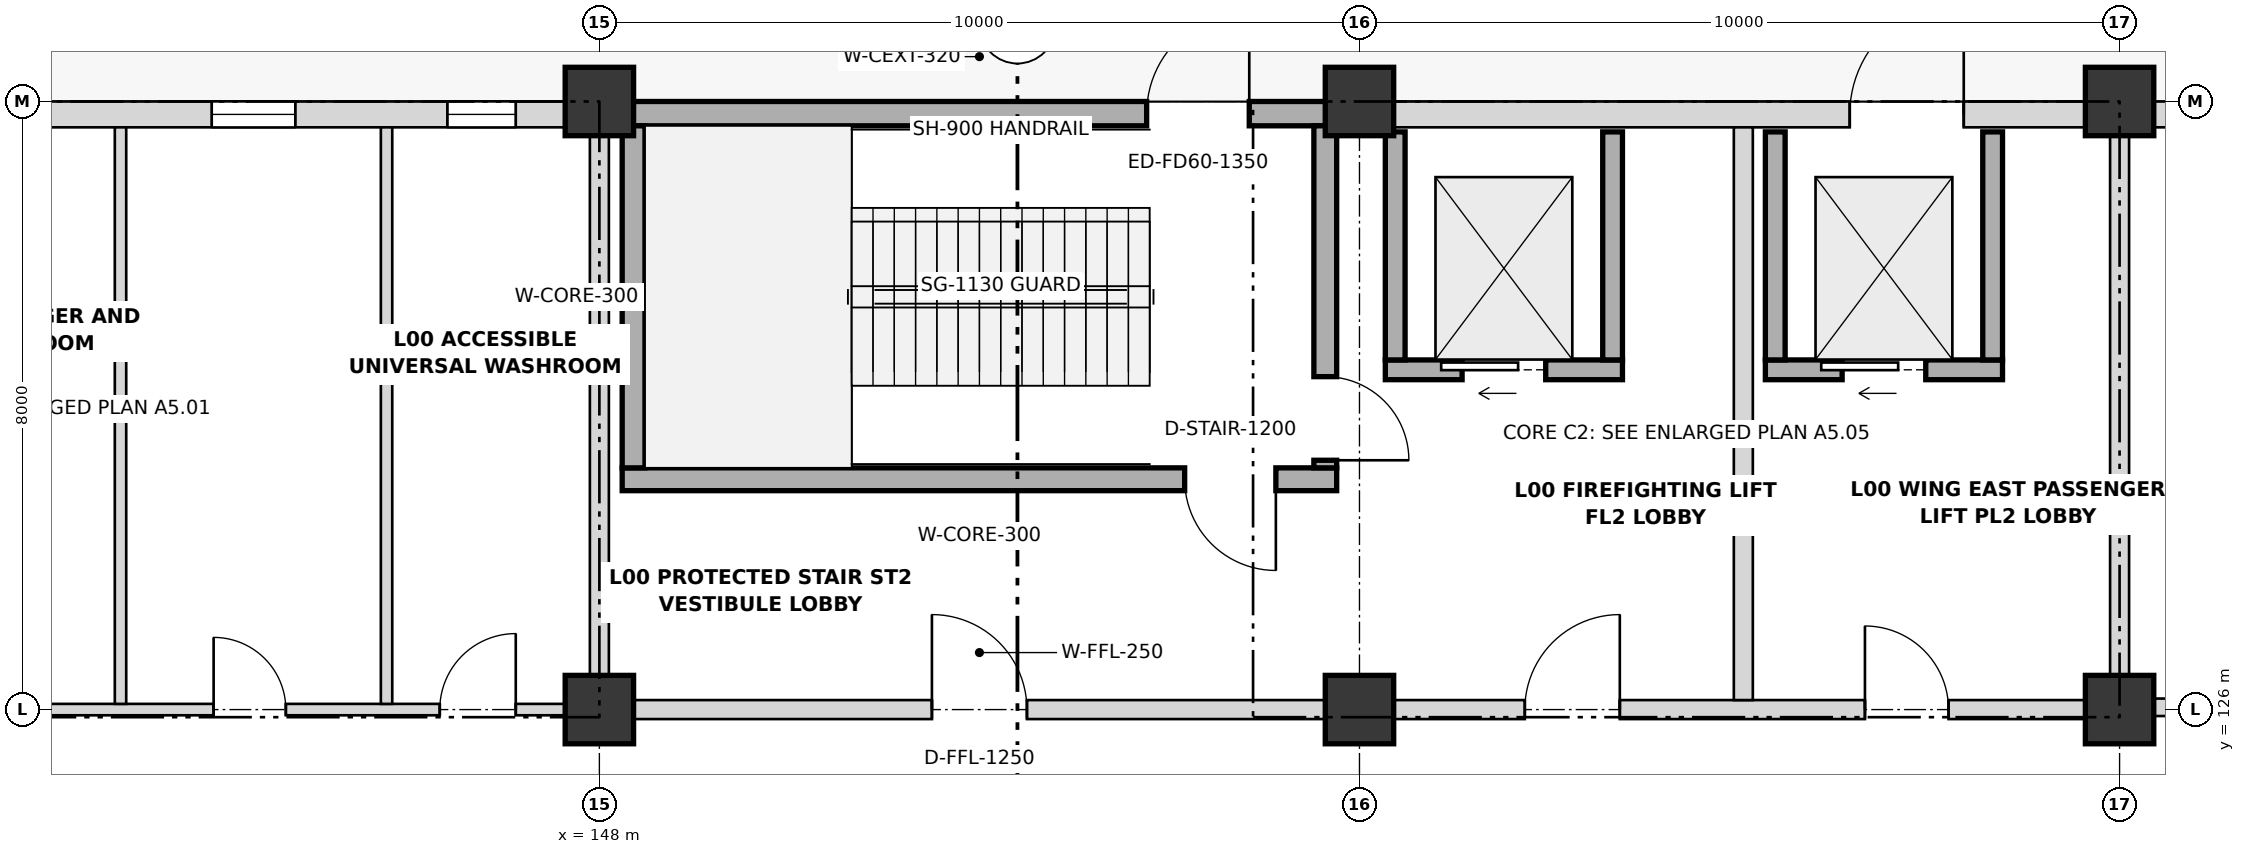
"""IFC4 building model, lengths in metres.
Left out: names, types, materials, properties, quantities, classifications, styles, units other than length and angle.
Written with IfcOpenShell. Run it as: python <this file> out.ifc"""

import sys

from ifc_helpers import new_model, si_unit, direction, frame, frame_2d, origin, origin_2d, place, context, subcontext, project, spatial, rectangle, extrude, element, fill, save


model = new_model("IFC4")
c1 = context("Model", 3, precision=1e-05, world=origin(), true_north=direction((0.0, 1.0)))
c2 = subcontext(c1, "Body", "Model", "MODEL_VIEW")
j1 = project(units=[si_unit("LENGTHUNIT", "METRE"), si_unit("PLANEANGLEUNIT", "RADIAN")], contexts=[c1])
p1 = place(None, origin())
s1 = spatial("IfcSite", under=j1, at=p1, CompositionType="ELEMENT")
p2 = place(p1, origin())
s2 = spatial("IfcBuilding", under=s1, at=p2, CompositionType="ELEMENT")
p3 = place(p2, origin())
s3 = spatial("IfcBuildingStorey", under=s2, at=p3, CompositionType="ELEMENT", Elevation=0.0)
for number, where, z_axis, x_axis in (
    (1, (148.0, 126.0, 0.0), (0.0, 0.0, 1.0), (1.0, 0.0, 0.0)),
    (2, (148.0, 134.0, 0.0), (0.0, 0.0, 1.0), (1.0, 0.0, 0.0)),
    (3, (158.0, 126.0, 0.0), (0.0, 0.0, 1.0), (1.0, 0.0, 0.0)),
    (4, (158.0, 134.0, 0.0), (0.0, 0.0, 1.0), (1.0, 0.0, 0.0)),
    (5, (168.0, 126.0, 0.0), (0.0, 0.0, 1.0), (1.0, 0.0, 0.0)),
    (6, (168.0, 134.0, 0.0), (0.0, 0.0, 1.0), (1.0, 0.0, 0.0)),
):
    element("IfcColumn", number, at=place(p3, frame(where, z_axis=z_axis, x_axis=x_axis)), inside=s3, PredefinedType="COLUMN", context=c2, shape_type="SweptSolid", body=[
        extrude(rectangle(XDim=0.9, YDim=0.9, at=origin_2d()), origin(), (0.0, 0.0, 1.0), 5.4),
    ])
p4 = place(p3, frame((138.445, 133.83, 0.0), z_axis=(0.0, 0.0, 1.0), x_axis=(1.0, 0.0, 0.0)))
e7 = element("IfcWall", 7, at=p4, inside=s3, PredefinedType="SOLIDWALL", context=c2, shape_type="SweptSolid", body=[
    extrude(rectangle(XDim=9.11, YDim=0.34, at=frame_2d((4.555, 0.0))), origin(), (0.0, 0.0, 1.0), 4.358),
])
p5 = place(p4, frame((1.155, 0.0, 1.85)))
e8 = element("IfcOpeningElement", 8, at=p5, cuts=e7, PredefinedType="OPENING", context=c2, shape_type="SweptSolid", body=[
    extrude(rectangle(XDim=0.9, YDim=1.15, at=frame_2d((0.45, 0.575))), frame((0.0, 0.18, 0.0), z_axis=(0.0, -1.0, 0.0), x_axis=(1.0, 0.0, 0.0)), (0.0, 0.0, 1.0), 0.36),
])
p6 = place(p4, frame((4.455, 0.0, 1.85)))
e9 = element("IfcOpeningElement", 9, at=p6, cuts=e7, PredefinedType="OPENING", context=c2, shape_type="SweptSolid", body=[
    extrude(rectangle(XDim=1.1, YDim=1.15, at=frame_2d((0.55, 0.575))), frame((0.0, 0.18, 0.0), z_axis=(0.0, -1.0, 0.0), x_axis=(1.0, 0.0, 0.0)), (0.0, 0.0, 1.0), 0.36),
])
p7 = place(p4, frame((7.555, 0.0, 1.85)))
e10 = element("IfcOpeningElement", 10, at=p7, cuts=e7, PredefinedType="OPENING", context=c2, shape_type="SweptSolid", body=[
    extrude(rectangle(XDim=0.9, YDim=1.15, at=frame_2d((0.45, 0.575))), frame((0.0, 0.18, 0.0), z_axis=(0.0, -1.0, 0.0), x_axis=(1.0, 0.0, 0.0)), (0.0, 0.0, 1.0), 0.36),
])
p8 = place(p3, frame((148.445, 133.84, 0.0), z_axis=(0.0, 0.0, 1.0), x_axis=(1.0, 0.0, 0.0)))
e11 = element("IfcWall", 11, at=p8, inside=s3, PredefinedType="SHEAR", context=c2, shape_type="SweptSolid", body=[
    extrude(rectangle(XDim=9.11, YDim=0.32, at=frame_2d((4.555, 0.0))), origin(), (0.0, 0.0, 1.0), 5.4),
])
p9 = place(p8, frame((6.755, 0.0, 0.0)))
e12 = element("IfcOpeningElement", 12, at=p9, cuts=e11, PredefinedType="OPENING", context=c2, shape_type="SweptSolid", body=[
    extrude(rectangle(XDim=1.35, YDim=2.2, at=frame_2d((0.675, 1.1))), frame((0.0, 0.17, 0.0), z_axis=(0.0, -1.0, 0.0), x_axis=(1.0, 0.0, 0.0)), (0.0, 0.0, 1.0), 0.34),
])
p10 = place(p3, frame((158.445, 133.83, 0.0), z_axis=(0.0, 0.0, 1.0), x_axis=(1.0, 0.0, 0.0)))
e13 = element("IfcWall", 13, at=p10, inside=s3, PredefinedType="SOLIDWALL", context=c2, shape_type="SweptSolid", body=[
    extrude(rectangle(XDim=9.11, YDim=0.34, at=frame_2d((4.555, 0.0))), origin(), (0.0, 0.0, 1.0), 4.358),
])
p11 = place(p10, frame((6.005, 0.0, 0.0)))
e14 = element("IfcOpeningElement", 14, at=p11, cuts=e13, PredefinedType="OPENING", context=c2, shape_type="SweptSolid", body=[
    extrude(rectangle(XDim=1.5, YDim=2.25, at=frame_2d((0.75, 1.125))), frame((0.0, 0.18, 0.0), z_axis=(0.0, -1.0, 0.0), x_axis=(1.0, 0.0, 0.0)), (0.0, 0.0, 1.0), 0.36),
])
p12 = place(p3, frame((168.445, 133.83, 0.0), z_axis=(0.0, 0.0, 1.0), x_axis=(1.0, 0.0, 0.0)))
e15 = element("IfcWall", 15, at=p12, inside=s3, PredefinedType="SOLIDWALL", context=c2, shape_type="SweptSolid", body=[
    extrude(rectangle(XDim=9.11, YDim=0.34, at=frame_2d((4.555, 0.0))), origin(), (0.0, 0.0, 1.0), 4.358),
])
p13 = place(p12, frame((2.755, 0.0, 0.0)))
e16 = element("IfcOpeningElement", 16, at=p13, cuts=e15, PredefinedType="OPENING", context=c2, shape_type="SweptSolid", body=[
    extrude(rectangle(XDim=1.8, YDim=2.25, at=frame_2d((0.9, 1.125))), frame((0.0, 0.18, 0.0), z_axis=(0.0, -1.0, 0.0), x_axis=(1.0, 0.0, 0.0)), (0.0, 0.0, 1.0), 0.36),
])
p14 = place(p12, frame((6.405, 0.0, 1.15)))
e17 = element("IfcOpeningElement", 17, at=p14, cuts=e15, PredefinedType="OPENING", context=c2, shape_type="SweptSolid", body=[
    extrude(rectangle(XDim=1.1, YDim=1.15, at=frame_2d((0.55, 0.575))), frame((0.0, 0.18, 0.0), z_axis=(0.0, -1.0, 0.0), x_axis=(1.0, 0.0, 0.0)), (0.0, 0.0, 1.0), 0.36),
])
p15 = place(p3, frame((157.7, 129.03, 0.0), z_axis=(0.0, 0.0, 1.0), x_axis=(-1.0, 0.0, 0.0)))
e18 = element("IfcWall", 18, at=p15, inside=s3, PredefinedType="SHEAR", context=c2, shape_type="SweptSolid", body=[
    extrude(rectangle(XDim=9.4, YDim=0.3, at=frame_2d((4.7, 0.0))), origin(), (0.0, 0.0, 1.0), 5.4),
])
p16 = place(p15, frame((0.8, 0.0, 0.0)))
e19 = element("IfcOpeningElement", 19, at=p16, cuts=e18, PredefinedType="OPENING", context=c2, shape_type="SweptSolid", body=[
    extrude(rectangle(XDim=1.2, YDim=2.15, at=frame_2d((0.6, 1.075))), frame((0.0, 0.16, 0.0), z_axis=(0.0, -1.0, 0.0), x_axis=(1.0, 0.0, 0.0)), (0.0, 0.0, 1.0), 0.32),
])
p17 = place(p3, frame((157.55, 133.68, 0.0), z_axis=(0.0, 0.0, 1.0), x_axis=(0.0, -1.0, 0.0)))
e20 = element("IfcWall", 20, at=p17, inside=s3, PredefinedType="SHEAR", context=c2, shape_type="SweptSolid", body=[
    extrude(rectangle(XDim=4.5, YDim=0.3, at=frame_2d((2.25, 0.0))), origin(), (0.0, 0.0, 1.0), 5.4),
])
p18 = place(p17, frame((3.3, 0.0, 0.0)))
e21 = element("IfcOpeningElement", 21, at=p18, cuts=e20, PredefinedType="OPENING", context=c2, shape_type="SweptSolid", body=[
    extrude(rectangle(XDim=1.1, YDim=2.15, at=frame_2d((0.55, 1.075))), frame((0.0, 0.16, 0.0), z_axis=(0.0, -1.0, 0.0), x_axis=(1.0, 0.0, 0.0)), (0.0, 0.0, 1.0), 0.32),
])
p19 = place(p3, frame((148.45, 129.18, 0.0), z_axis=(0.0, 0.0, 1.0), x_axis=(0.0, 1.0, 0.0)))
e22 = element("IfcWall", 22, at=p19, inside=s3, PredefinedType="SHEAR", context=c2, shape_type="SweptSolid", body=[
    extrude(rectangle(XDim=4.5, YDim=0.3, at=frame_2d((2.25, 0.0))), origin(), (0.0, 0.0, 1.0), 5.4),
])
p20 = place(p3, frame((158.34, 130.47, 0.0), z_axis=(0.0, 0.0, 1.0), x_axis=(1.0, 0.0, 0.0)))
e23 = element("IfcWall", 23, at=p20, inside=s3, PredefinedType="SHEAR", context=c2, shape_type="SweptSolid", body=[
    extrude(rectangle(XDim=3.12, YDim=0.26, at=frame_2d((1.56, 0.0))), origin(), (0.0, 0.0, 1.0), 5.4),
])
p21 = place(p20, frame((1.01, 0.0, 0.0)))
e24 = element("IfcOpeningElement", 24, at=p21, cuts=e23, PredefinedType="OPENING", context=c2, shape_type="SweptSolid", body=[
    extrude(rectangle(XDim=1.1, YDim=2.1, at=frame_2d((0.55, 1.05))), frame((0.0, 0.14, 0.0), z_axis=(0.0, -1.0, 0.0), x_axis=(1.0, 0.0, 0.0)), (0.0, 0.0, 1.0), 0.28),
])
for number, where, z_axis, x_axis in (
    (25, (158.47, 130.6, 0.0), (0.0, 0.0, 1.0), (0.0, 1.0, 0.0)),
    (26, (161.33, 130.6, 0.0), (0.0, 0.0, 1.0), (0.0, 1.0, 0.0)),
):
    element("IfcWall", number, at=place(p3, frame(where, z_axis=z_axis, x_axis=x_axis)), inside=s3, PredefinedType="SHEAR", context=c2, shape_type="SweptSolid", body=[
        extrude(rectangle(XDim=3.0, YDim=0.26, at=frame_2d((1.5, 0.0))), origin(), (0.0, 0.0, 1.0), 5.4),
    ])
p22 = place(p3, frame((163.34, 130.47, 0.0), z_axis=(0.0, 0.0, 1.0), x_axis=(1.0, 0.0, 0.0)))
e27 = element("IfcWall", 27, at=p22, inside=s3, PredefinedType="SHEAR", context=c2, shape_type="SweptSolid", body=[
    extrude(rectangle(XDim=3.12, YDim=0.26, at=frame_2d((1.56, 0.0))), origin(), (0.0, 0.0, 1.0), 5.4),
])
p23 = place(p22, frame((1.01, 0.0, 0.0)))
e28 = element("IfcOpeningElement", 28, at=p23, cuts=e27, PredefinedType="OPENING", context=c2, shape_type="SweptSolid", body=[
    extrude(rectangle(XDim=1.1, YDim=2.15, at=frame_2d((0.55, 1.075))), frame((0.0, 0.14, 0.0), z_axis=(0.0, -1.0, 0.0), x_axis=(1.0, 0.0, 0.0)), (0.0, 0.0, 1.0), 0.28),
])
for number, where, z_axis, x_axis in (
    (29, (163.47, 130.6, 0.0), (0.0, 0.0, 1.0), (0.0, 1.0, 0.0)),
    (30, (166.33, 130.6, 0.0), (0.0, 0.0, 1.0), (0.0, 1.0, 0.0)),
):
    element("IfcWall", number, at=place(p3, frame(where, z_axis=z_axis, x_axis=x_axis)), inside=s3, PredefinedType="SHEAR", context=c2, shape_type="SweptSolid", body=[
        extrude(rectangle(XDim=3.0, YDim=0.26, at=frame_2d((1.5, 0.0))), origin(), (0.0, 0.0, 1.0), 5.4),
    ])
p24 = place(p3, frame((138.455, 126.0, 0.0), z_axis=(0.0, 0.0, 1.0), x_axis=(1.0, 0.0, 0.0)))
e31 = element("IfcWall", 31, at=p24, inside=s3, PredefinedType="PARTITIONING", context=c2, shape_type="SweptSolid", body=[
    extrude(rectangle(XDim=9.09, YDim=0.15, at=frame_2d((4.545, 0.0))), origin(), (0.0, 0.0, 1.0), 4.258),
])
p25 = place(p24, frame((1.095, 0.0, 0.0)))
e32 = element("IfcOpeningElement", 32, at=p25, cuts=e31, PredefinedType="OPENING", context=c2, shape_type="SweptSolid", body=[
    extrude(rectangle(XDim=0.9, YDim=2.05, at=frame_2d((0.45, 1.025))), frame((0.0, 0.085, 0.0), z_axis=(0.0, -1.0, 0.0), x_axis=(1.0, 0.0, 0.0)), (0.0, 0.0, 1.0), 0.17),
])
p26 = place(p24, frame((4.47, 0.0, 0.0)))
e33 = element("IfcOpeningElement", 33, at=p26, cuts=e31, PredefinedType="OPENING", context=c2, shape_type="SweptSolid", body=[
    extrude(rectangle(XDim=0.95, YDim=2.05, at=frame_2d((0.475, 1.025))), frame((0.0, 0.085, 0.0), z_axis=(0.0, -1.0, 0.0), x_axis=(1.0, 0.0, 0.0)), (0.0, 0.0, 1.0), 0.17),
])
p27 = place(p24, frame((7.445, 0.0, 0.0)))
e34 = element("IfcOpeningElement", 34, at=p27, cuts=e31, PredefinedType="OPENING", context=c2, shape_type="SweptSolid", body=[
    extrude(rectangle(XDim=1.0, YDim=2.05, at=frame_2d((0.5, 1.025))), frame((0.0, 0.085, 0.0), z_axis=(0.0, -1.0, 0.0), x_axis=(1.0, 0.0, 0.0)), (0.0, 0.0, 1.0), 0.17),
])
p28 = place(p3, frame((148.455, 126.0, 0.0), z_axis=(0.0, 0.0, 1.0), x_axis=(1.0, 0.0, 0.0)))
e35 = element("IfcWall", 35, at=p28, inside=s3, PredefinedType="PARTITIONING", context=c2, shape_type="SweptSolid", body=[
    extrude(rectangle(XDim=9.09, YDim=0.25, at=frame_2d((4.545, 0.0))), origin(), (0.0, 0.0, 1.0), 4.258),
])
p29 = place(p28, frame((3.92, 0.0, 0.0)))
e36 = element("IfcOpeningElement", 36, at=p29, cuts=e35, PredefinedType="OPENING", context=c2, shape_type="SweptSolid", body=[
    extrude(rectangle(XDim=1.25, YDim=2.15, at=frame_2d((0.625, 1.075))), frame((0.0, 0.135, 0.0), z_axis=(0.0, -1.0, 0.0), x_axis=(1.0, 0.0, 0.0)), (0.0, 0.0, 1.0), 0.27),
])
p30 = place(p3, frame((158.455, 126.0, 0.0), z_axis=(0.0, 0.0, 1.0), x_axis=(1.0, 0.0, 0.0)))
e37 = element("IfcWall", 37, at=p30, inside=s3, PredefinedType="PARTITIONING", context=c2, shape_type="SweptSolid", body=[
    extrude(rectangle(XDim=9.09, YDim=0.25, at=frame_2d((4.545, 0.0))), origin(), (0.0, 0.0, 1.0), 4.258),
])
p31 = place(p30, frame((1.72, 0.0, 0.0)))
e38 = element("IfcOpeningElement", 38, at=p31, cuts=e37, PredefinedType="OPENING", context=c2, shape_type="SweptSolid", body=[
    extrude(rectangle(XDim=1.25, YDim=2.15, at=frame_2d((0.625, 1.075))), frame((0.0, 0.135, 0.0), z_axis=(0.0, -1.0, 0.0), x_axis=(1.0, 0.0, 0.0)), (0.0, 0.0, 1.0), 0.27),
])
p32 = place(p30, frame((6.195, 0.0, 0.0)))
e39 = element("IfcOpeningElement", 39, at=p32, cuts=e37, PredefinedType="OPENING", context=c2, shape_type="SweptSolid", body=[
    extrude(rectangle(XDim=1.1, YDim=2.15, at=frame_2d((0.55, 1.075))), frame((0.0, 0.135, 0.0), z_axis=(0.0, -1.0, 0.0), x_axis=(1.0, 0.0, 0.0)), (0.0, 0.0, 1.0), 0.27),
])
p33 = place(p3, frame((163.05, 126.125, 0.0), z_axis=(0.0, 0.0, 1.0), x_axis=(0.0, 1.0, 0.0)))
e40 = element("IfcWall", 40, at=p33, inside=s3, PredefinedType="PARTITIONING", context=c2, shape_type="SweptSolid", body=[
    extrude(rectangle(XDim=7.535, YDim=0.25, at=frame_2d((3.768, 0.0))), origin(), (0.0, 0.0, 1.0), 4.258),
])
for number, where, z_axis, x_axis in (
    (41, (141.7, 126.075, 0.0), (0.0, 0.0, 1.0), (0.0, 1.0, 0.0)),
    (42, (145.2, 126.075, 0.0), (0.0, 0.0, 1.0), (0.0, 1.0, 0.0)),
):
    element("IfcWall", number, at=place(p3, frame(where, z_axis=z_axis, x_axis=x_axis)), inside=s3, PredefinedType="PARTITIONING", context=c2, shape_type="SweptSolid", body=[
        extrude(rectangle(XDim=7.585, YDim=0.15, at=frame_2d((3.792, 0.0))), origin(), (0.0, 0.0, 1.0), 4.258),
    ])
for number, where, z_axis, x_axis in (
    (43, (148.0, 126.455, 0.0), (0.0, 0.0, 1.0), (0.0, 1.0, 0.0)),
    (44, (168.0, 126.455, 0.0), (0.0, 0.0, 1.0), (0.0, 1.0, 0.0)),
):
    element("IfcWall", number, at=place(p3, frame(where, z_axis=z_axis, x_axis=x_axis)), inside=s3, PredefinedType="PARTITIONING", context=c2, shape_type="SweptSolid", body=[
        extrude(rectangle(XDim=7.09, YDim=0.25, at=frame_2d((3.545, 0.0))), origin(), (0.0, 0.0, 1.0), 4.358),
    ])
p34 = place(p3, frame((168.3, 126.03, 0.0), z_axis=(0.0, 0.0, 1.0), x_axis=(1.0, 0.0, 0.0)))
e45 = element("IfcWall", 45, at=p34, inside=s3, PredefinedType="PARTITIONING", context=c2, shape_type="SweptSolid", body=[
    extrude(rectangle(XDim=9.4, YDim=0.23, at=frame_2d((4.7, 0.0))), origin(), (0.0, 0.0, 1.0), 4.258),
])
p35 = place(p34, frame((4.0, 0.0, 0.0)))
e46 = element("IfcOpeningElement", 46, at=p35, cuts=e45, PredefinedType="OPENING", context=c2, shape_type="SweptSolid", body=[
    extrude(rectangle(XDim=1.4, YDim=2.2, at=frame_2d((0.7, 1.1))), frame((0.0, 0.125, 0.0), z_axis=(0.0, -1.0, 0.0), x_axis=(1.0, 0.0, 0.0)), (0.0, 0.0, 1.0), 0.25),
])
p36 = place(p6, origin())
e47 = element("IfcWindow", 47, at=p36, inside=s3, PartitioningType="SINGLE_PANEL", PredefinedType="WINDOW", context=c2, shape_type="SweptSolid", body=[
    extrude(rectangle(XDim=1.1, YDim=1.15, at=frame_2d((0.55, 0.575))), frame((0.0, 0.03, 0.0), z_axis=(0.0, -1.0, 0.0), x_axis=(1.0, 0.0, 0.0)), (0.0, 0.0, 1.0), 0.06),
])
fill(e9, e47)
p37 = place(p7, origin())
e48 = element("IfcWindow", 48, at=p37, inside=s3, PartitioningType="SINGLE_PANEL", PredefinedType="WINDOW", context=c2, shape_type="SweptSolid", body=[
    extrude(rectangle(XDim=0.9, YDim=1.15, at=frame_2d((0.45, 0.575))), frame((0.0, 0.03, 0.0), z_axis=(0.0, -1.0, 0.0), x_axis=(1.0, 0.0, 0.0)), (0.0, 0.0, 1.0), 0.06),
])
fill(e10, e48)
p38 = place(p9, origin())
e49 = element("IfcDoor", 49, at=p38, inside=s3, OperationType="SINGLE_SWING_RIGHT", PredefinedType="DOOR", context=c2, shape_type="SweptSolid", body=[
    extrude(rectangle(XDim=1.35, YDim=2.2, at=frame_2d((0.675, 1.1))), frame((0.0, 0.025, 0.0), z_axis=(0.0, -1.0, 0.0), x_axis=(1.0, 0.0, 0.0)), (0.0, 0.0, 1.0), 0.05),
])
fill(e12, e49)
p39 = place(p11, origin())
e50 = element("IfcDoor", 50, at=p39, inside=s3, OperationType="SINGLE_SWING_RIGHT", PredefinedType="DOOR", context=c2, shape_type="SweptSolid", body=[
    extrude(rectangle(XDim=1.5, YDim=2.25, at=frame_2d((0.75, 1.125))), frame((0.0, 0.025, 0.0), z_axis=(0.0, -1.0, 0.0), x_axis=(1.0, 0.0, 0.0)), (0.0, 0.0, 1.0), 0.05),
])
fill(e14, e50)
p40 = place(p16, origin())
e51 = element("IfcDoor", 51, at=p40, inside=s3, OperationType="SINGLE_SWING_LEFT", PredefinedType="DOOR", context=c2, shape_type="SweptSolid", body=[
    extrude(rectangle(XDim=1.2, YDim=2.15, at=frame_2d((0.6, 1.075))), frame((0.0, 0.025, 0.0), z_axis=(0.0, -1.0, 0.0), x_axis=(1.0, 0.0, 0.0)), (0.0, 0.0, 1.0), 0.05),
])
fill(e19, e51)
p41 = place(p18, origin())
e52 = element("IfcDoor", 52, at=p41, inside=s3, OperationType="SINGLE_SWING_RIGHT", PredefinedType="DOOR", context=c2, shape_type="SweptSolid", body=[
    extrude(rectangle(XDim=1.1, YDim=2.15, at=frame_2d((0.55, 1.075))), frame((0.0, 0.025, 0.0), z_axis=(0.0, -1.0, 0.0), x_axis=(1.0, 0.0, 0.0)), (0.0, 0.0, 1.0), 0.05),
])
fill(e21, e52)
p42 = place(p21, origin())
e53 = element("IfcDoor", 53, at=p42, inside=s3, OperationType="SLIDING_TO_LEFT", PredefinedType="DOOR", context=c2, shape_type="SweptSolid", body=[
    extrude(rectangle(XDim=1.1, YDim=2.1, at=frame_2d((0.55, 1.05))), frame((0.0, 0.025, 0.0), z_axis=(0.0, -1.0, 0.0), x_axis=(1.0, 0.0, 0.0)), (0.0, 0.0, 1.0), 0.05),
])
fill(e24, e53)
p43 = place(p23, origin())
e54 = element("IfcDoor", 54, at=p43, inside=s3, OperationType="SLIDING_TO_LEFT", PredefinedType="DOOR", context=c2, shape_type="SweptSolid", body=[
    extrude(rectangle(XDim=1.1, YDim=2.15, at=frame_2d((0.55, 1.075))), frame((0.0, 0.025, 0.0), z_axis=(0.0, -1.0, 0.0), x_axis=(1.0, 0.0, 0.0)), (0.0, 0.0, 1.0), 0.05),
])
fill(e28, e54)
p44 = place(p26, origin())
e55 = element("IfcDoor", 55, at=p44, inside=s3, OperationType="SINGLE_SWING_LEFT", PredefinedType="DOOR", context=c2, shape_type="SweptSolid", body=[
    extrude(rectangle(XDim=0.95, YDim=2.05, at=frame_2d((0.475, 1.025))), frame((0.0, 0.025, 0.0), z_axis=(0.0, -1.0, 0.0), x_axis=(1.0, 0.0, 0.0)), (0.0, 0.0, 1.0), 0.05),
])
fill(e33, e55)
p45 = place(p27, origin())
e56 = element("IfcDoor", 56, at=p45, inside=s3, OperationType="SINGLE_SWING_RIGHT", PredefinedType="DOOR", context=c2, shape_type="SweptSolid", body=[
    extrude(rectangle(XDim=1.0, YDim=2.05, at=frame_2d((0.5, 1.025))), frame((0.0, 0.025, 0.0), z_axis=(0.0, -1.0, 0.0), x_axis=(1.0, 0.0, 0.0)), (0.0, 0.0, 1.0), 0.05),
])
fill(e34, e56)
p46 = place(p29, origin())
e57 = element("IfcDoor", 57, at=p46, inside=s3, OperationType="SINGLE_SWING_LEFT", PredefinedType="DOOR", context=c2, shape_type="SweptSolid", body=[
    extrude(rectangle(XDim=1.25, YDim=2.15, at=frame_2d((0.625, 1.075))), frame((0.0, 0.025, 0.0), z_axis=(0.0, -1.0, 0.0), x_axis=(1.0, 0.0, 0.0)), (0.0, 0.0, 1.0), 0.05),
])
fill(e36, e57)
p47 = place(p31, origin())
e58 = element("IfcDoor", 58, at=p47, inside=s3, OperationType="SINGLE_SWING_RIGHT", PredefinedType="DOOR", context=c2, shape_type="SweptSolid", body=[
    extrude(rectangle(XDim=1.25, YDim=2.15, at=frame_2d((0.625, 1.075))), frame((0.0, 0.025, 0.0), z_axis=(0.0, -1.0, 0.0), x_axis=(1.0, 0.0, 0.0)), (0.0, 0.0, 1.0), 0.05),
])
fill(e38, e58)
p48 = place(p32, origin())
e59 = element("IfcDoor", 59, at=p48, inside=s3, OperationType="SINGLE_SWING_LEFT", PredefinedType="DOOR", context=c2, shape_type="SweptSolid", body=[
    extrude(rectangle(XDim=1.1, YDim=2.15, at=frame_2d((0.55, 1.075))), frame((0.0, 0.025, 0.0), z_axis=(0.0, -1.0, 0.0), x_axis=(1.0, 0.0, 0.0)), (0.0, 0.0, 1.0), 0.05),
])
fill(e39, e59)
save(model, sys.argv[1])
